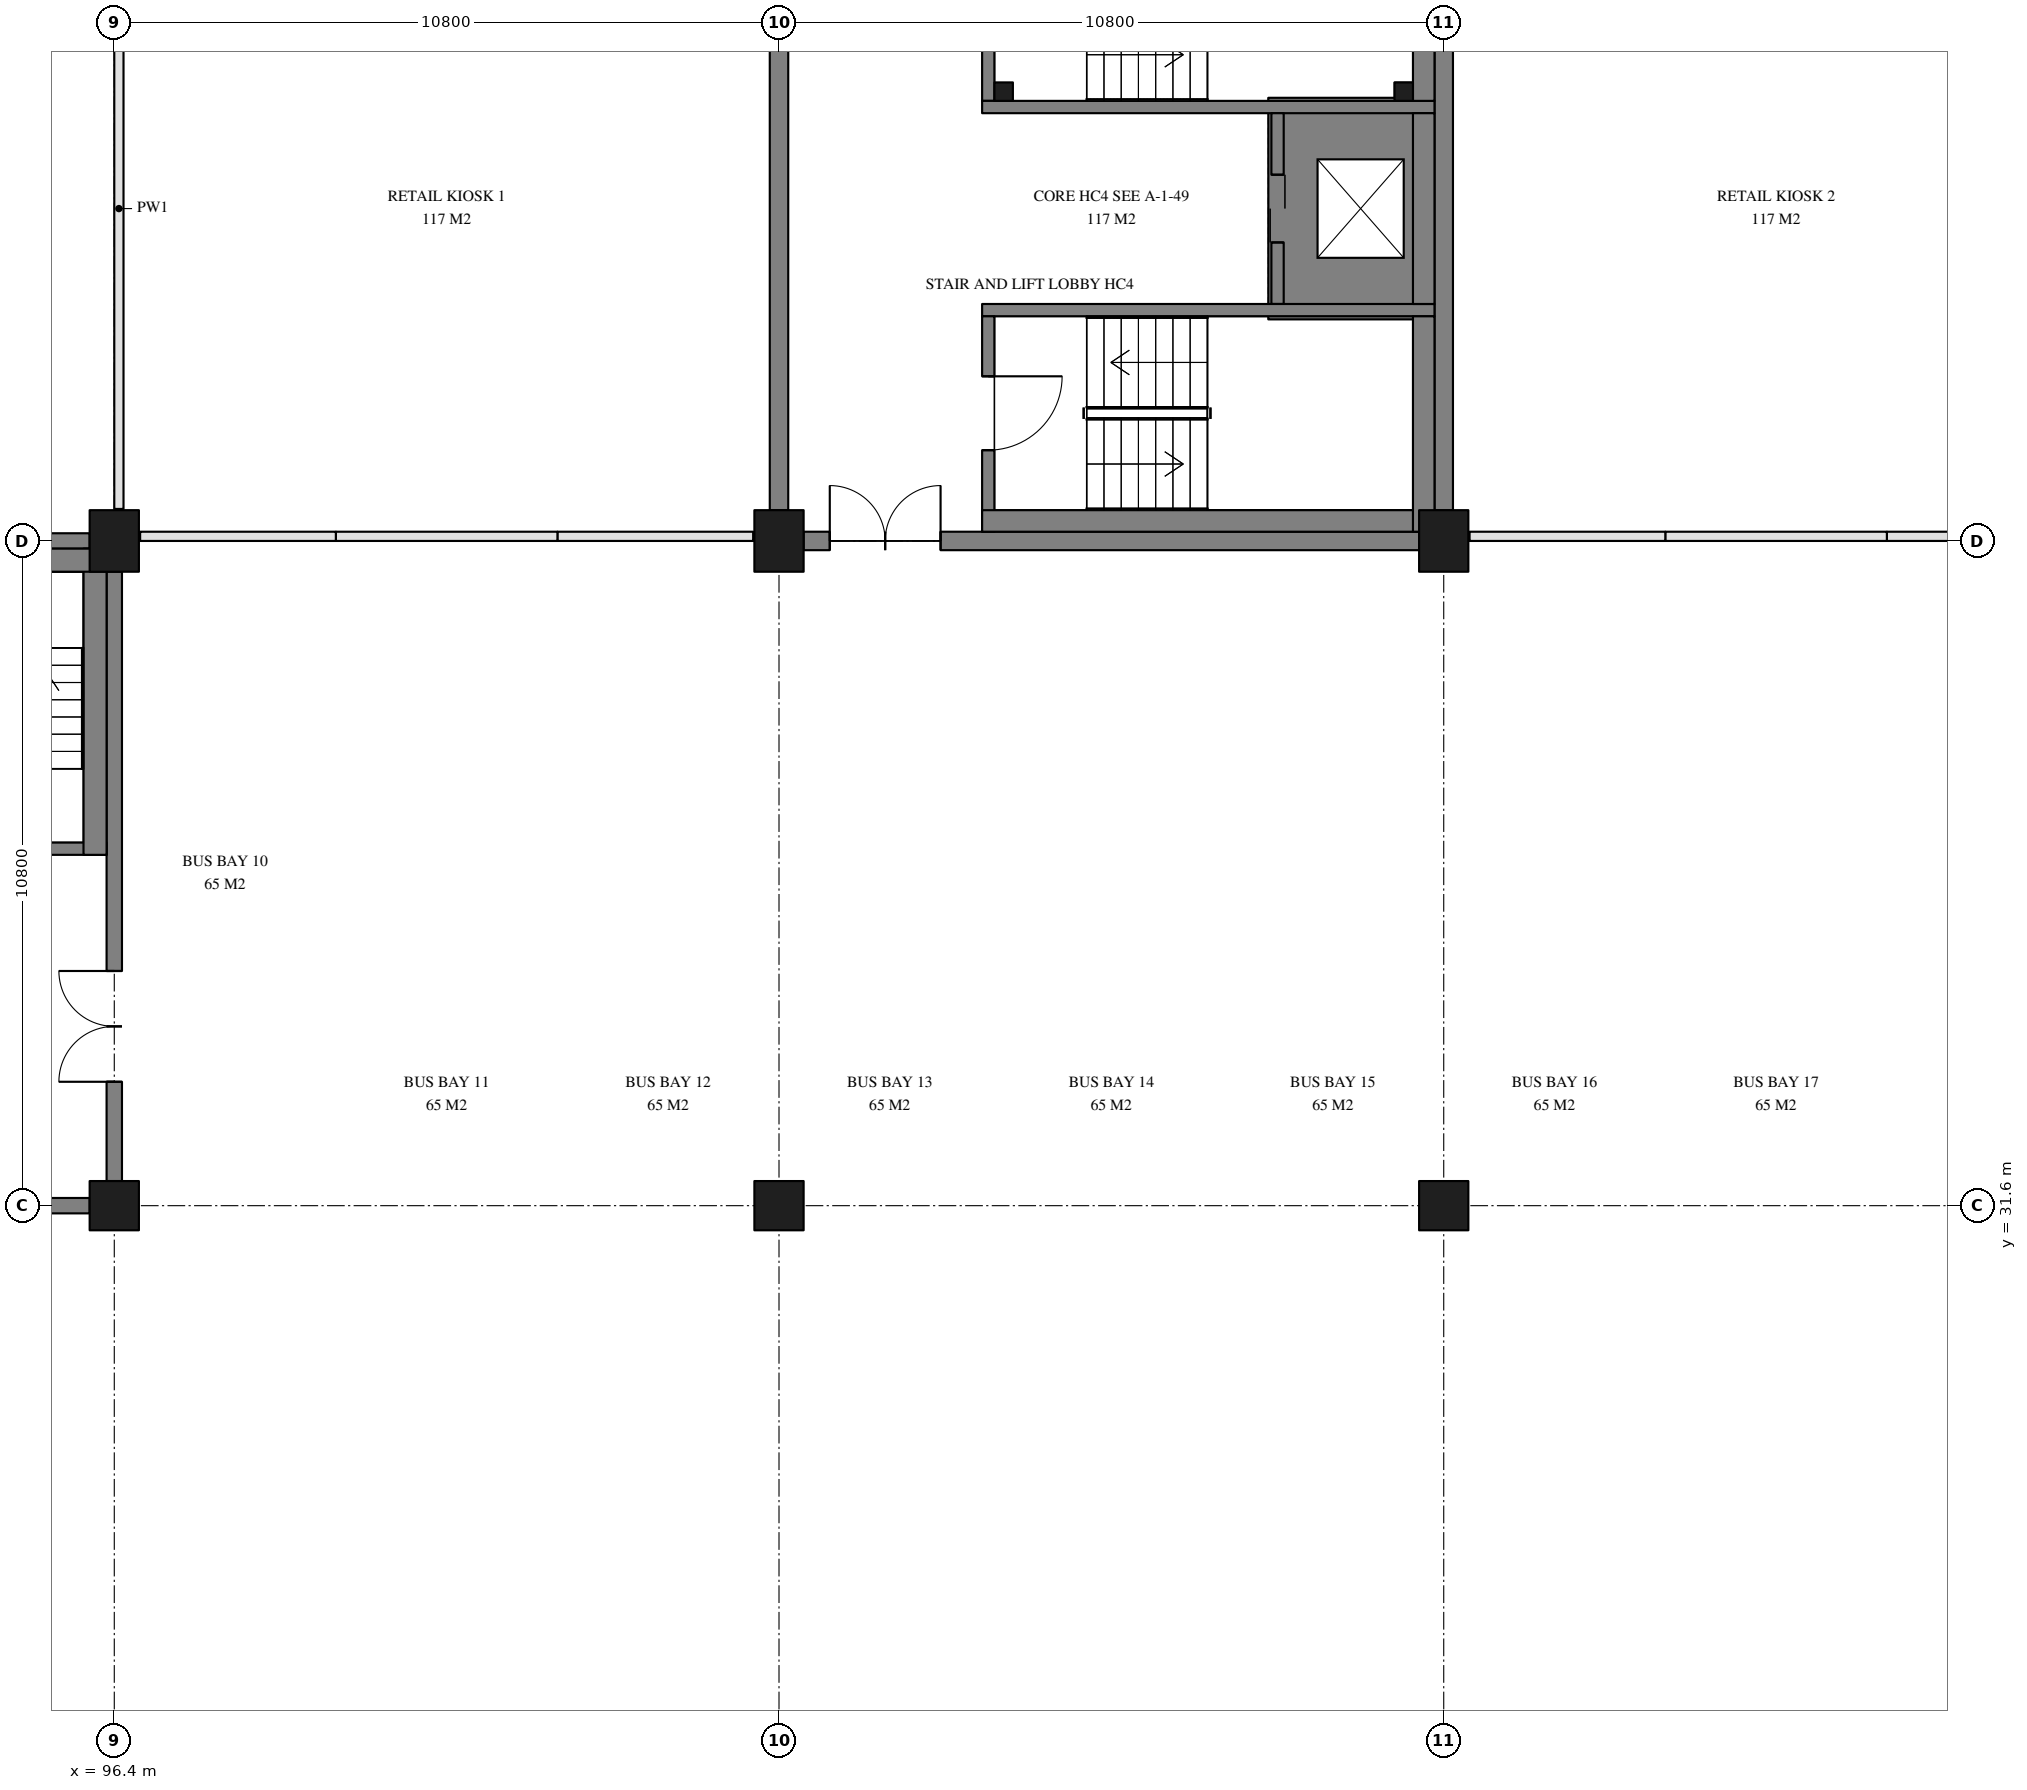
"""IFC4 building model, lengths in metres.
Left out: names, types, materials, properties, quantities, classifications, styles, units other than length and angle.
Written with IfcOpenShell. Run it as: python <this file> out.ifc"""

import sys

from ifc_helpers import new_model, si_unit, direction, frame, frame_2d, origin, origin_2d, place, context, subcontext, project, spatial, polyline, rectangle, outline, extrude, element, fill, save


model = new_model("IFC4")
c1 = context("Model", 3, precision=1e-05, world=origin(), true_north=direction((0.0, 1.0)))
c2 = subcontext(c1, "Body", "Model", "MODEL_VIEW")
j1 = project(units=[si_unit("LENGTHUNIT", "METRE"), si_unit("PLANEANGLEUNIT", "RADIAN")], contexts=[c1])
p1 = place(None, origin())
s1 = spatial("IfcSite", under=j1, at=p1, CompositionType="ELEMENT")
p2 = place(p1, origin())
s2 = spatial("IfcBuilding", under=s1, at=p2, CompositionType="ELEMENT")
p3 = place(p2, frame((0.0, 0.0, -5.4)))
s3 = spatial("IfcBuildingStorey", under=s2, at=p3, CompositionType="ELEMENT", Elevation=-5.4)
for number, where, z_axis, x_axis in (
    (1, (96.4, 42.4, -0.4), (0.0, 0.0, 1.0), (1.0, 0.0, 0.0)),
    (2, (107.2, 42.4, -0.4), (0.0, 0.0, 1.0), (1.0, 0.0, 0.0)),
    (3, (118.0, 42.4, -0.4), (0.0, 0.0, 1.0), (1.0, 0.0, 0.0)),
):
    element("IfcColumn", number, at=place(p3, frame(where, z_axis=z_axis, x_axis=x_axis)), inside=s3, PredefinedType="COLUMN", context=c2, shape_type="SweptSolid", body=[
        extrude(rectangle(XDim=0.8, YDim=1.0, at=origin_2d()), origin(), (0.0, 0.0, 1.0), 5.8),
    ])
for number, where, z_axis, x_axis in (
    (4, (96.4, 31.6, -0.4), (0.0, 0.0, 1.0), (1.0, 0.0, 0.0)),
    (5, (107.2, 31.6, -0.4), (0.0, 0.0, 1.0), (1.0, 0.0, 0.0)),
    (6, (118.0, 31.6, -0.4), (0.0, 0.0, 1.0), (1.0, 0.0, 0.0)),
):
    element("IfcColumn", number, at=place(p3, frame(where, z_axis=z_axis, x_axis=x_axis)), inside=s3, PredefinedType="COLUMN", context=c2, shape_type="SweptSolid", body=[
        extrude(rectangle(XDim=0.8, YDim=0.8, at=origin_2d()), origin(), (0.0, 0.0, 1.0), 5.8),
    ])
p4 = place(p3, frame((0.0, 0.0, -1.4)))
e7 = element("IfcWall", 7, at=p4, inside=s3, PredefinedType="SOLIDWALL", context=c2, shape_type="SweptSolid", body=[
    extrude(outline(polyline([(115.15, 49.6), (115.15, 46.0), (117.75, 46.0), (117.75, 49.6), (115.15, 49.6)]), holes=[polyline([(115.4, 46.25), (117.5, 46.25), (117.5, 49.35), (115.4, 49.35), (115.4, 46.25)])]), origin(), (0.0, 0.0, 1.0), 1.4),
])
p5 = place(p3, frame((107.6, 42.4, 0.0), z_axis=(0.0, 0.0, 1.0), x_axis=(1.0, 0.0, 0.0)))
e8 = element("IfcWall", 8, at=p5, inside=s3, PredefinedType="SOLIDWALL", context=c2, shape_type="SweptSolid", body=[
    extrude(rectangle(XDim=10.0, YDim=0.3, at=frame_2d((5.0, 0.0))), origin(), (0.0, 0.0, 1.0), 5.4),
])
p6 = place(p5, frame((0.425, 0.0, 0.0)))
e9 = element("IfcOpeningElement", 9, at=p6, cuts=e8, PredefinedType="OPENING", context=c2, shape_type="SweptSolid", body=[
    extrude(rectangle(XDim=1.8, YDim=2.1, at=frame_2d((0.9, 1.05))), frame((0.0, 0.16, 0.0), z_axis=(0.0, -1.0, 0.0), x_axis=(1.0, 0.0, 0.0)), (0.0, 0.0, 1.0), 0.32),
])
for number, where, z_axis, x_axis in (
    (10, (118.0, 42.9, 0.0), (0.0, 0.0, 1.0), (0.0, 1.0, 0.0)),
    (11, (107.2, 52.7, 0.0), (0.0, 0.0, 1.0), (0.0, -1.0, 0.0)),
):
    element("IfcWall", number, at=place(p3, frame(where, z_axis=z_axis, x_axis=x_axis)), inside=s3, PredefinedType="SOLIDWALL", context=c2, shape_type="SweptSolid", body=[
        extrude(rectangle(XDim=9.8, YDim=0.3, at=frame_2d((4.9, 0.0))), origin(), (0.0, 0.0, 1.0), 5.4),
    ])
p7 = place(p3, frame((86.0, 31.6, 0.0), z_axis=(0.0, 0.0, 1.0), x_axis=(1.0, 0.0, 0.0)))
e12 = element("IfcWall", 12, at=p7, inside=s3, PredefinedType="SOLIDWALL", context=c2, shape_type="SweptSolid", body=[
    extrude(rectangle(XDim=10.0, YDim=0.25, at=frame_2d((5.0, 0.0))), origin(), (0.0, 0.0, 1.0), 5.4),
])
p8 = place(p7, frame((4.1, 0.0, 0.0)))
e13 = element("IfcOpeningElement", 13, at=p8, cuts=e12, PredefinedType="OPENING", context=c2, shape_type="SweptSolid", body=[
    extrude(rectangle(XDim=1.8, YDim=2.1, at=frame_2d((0.9, 1.05))), frame((0.0, 0.135, 0.0), z_axis=(0.0, -1.0, 0.0), x_axis=(1.0, 0.0, 0.0)), (0.0, 0.0, 1.0), 0.27),
])
p9 = place(p3, frame((96.4, 32.0, 0.0), z_axis=(0.0, 0.0, 1.0), x_axis=(0.0, 1.0, 0.0)))
e14 = element("IfcWall", 14, at=p9, inside=s3, PredefinedType="SOLIDWALL", context=c2, shape_type="SweptSolid", body=[
    extrude(rectangle(XDim=9.9, YDim=0.25, at=frame_2d((4.95, 0.0))), origin(), (0.0, 0.0, 1.0), 5.4),
])
p10 = place(p9, frame((1.613, 0.0, 0.0)))
e15 = element("IfcOpeningElement", 15, at=p10, cuts=e14, PredefinedType="OPENING", context=c2, shape_type="SweptSolid", body=[
    extrude(rectangle(XDim=1.8, YDim=2.1, at=frame_2d((0.9, 1.05))), frame((0.0, 0.135, 0.0), z_axis=(0.0, -1.0, 0.0), x_axis=(1.0, 0.0, 0.0)), (0.0, 0.0, 1.0), 0.27),
])
p11 = place(p3, frame((96.0, 42.4, 0.0), z_axis=(0.0, 0.0, 1.0), x_axis=(-1.0, 0.0, 0.0)))
e16 = element("IfcWall", 16, at=p11, inside=s3, PredefinedType="SOLIDWALL", context=c2, shape_type="SweptSolid", body=[
    extrude(rectangle(XDim=10.0, YDim=0.25, at=frame_2d((5.0, 0.0))), origin(), (0.0, 0.0, 1.0), 5.4),
])
p12 = place(p3, frame((110.6, 53.05, 0.0), z_axis=(0.0, 0.0, 1.0), x_axis=(0.0, -1.0, 0.0)))
e17 = element("IfcWall", 17, at=p12, inside=s3, PredefinedType="SOLIDWALL", context=c2, shape_type="SweptSolid", body=[
    extrude(rectangle(XDim=3.5, YDim=0.2, at=frame_2d((1.75, 0.0))), origin(), (0.0, 0.0, 1.0), 4.8),
])
p13 = place(p12, frame((1.325, 0.0, 0.0)))
e18 = element("IfcOpeningElement", 18, at=p13, cuts=e17, PredefinedType="OPENING", context=c2, shape_type="SweptSolid", body=[
    extrude(rectangle(XDim=1.2, YDim=2.1, at=frame_2d((0.6, 1.05))), frame((0.0, 0.11, 0.0), z_axis=(0.0, -1.0, 0.0), x_axis=(1.0, 0.0, 0.0)), (0.0, 0.0, 1.0), 0.22),
])
p14 = place(p3, frame((110.5, 49.45, 0.0), z_axis=(0.0, 0.0, 1.0), x_axis=(1.0, 0.0, 0.0)))
e19 = element("IfcWall", 19, at=p14, inside=s3, PredefinedType="SOLIDWALL", context=c2, shape_type="SweptSolid", body=[
    extrude(rectangle(XDim=7.35, YDim=0.2, at=frame_2d((3.675, 0.0))), origin(), (0.0, 0.0, 1.0), 4.8),
])
p15 = place(p3, frame((115.3, 49.35, 0.0), z_axis=(0.0, 0.0, 1.0), x_axis=(0.0, -1.0, 0.0)))
e20 = element("IfcWall", 20, at=p15, inside=s3, PredefinedType="SOLIDWALL", context=c2, shape_type="SweptSolid", body=[
    extrude(rectangle(XDim=3.1, YDim=0.2, at=frame_2d((1.55, 0.0))), origin(), (0.0, 0.0, 1.0), 4.8),
])
p16 = place(p15, frame((1.0, 0.0, 0.0)))
e21 = element("IfcOpeningElement", 21, at=p16, cuts=e20, PredefinedType="OPENING", context=c2, shape_type="SweptSolid", body=[
    extrude(rectangle(XDim=1.1, YDim=2.1, at=frame_2d((0.55, 1.05))), frame((0.0, 0.11, 0.0), z_axis=(0.0, -1.0, 0.0), x_axis=(1.0, 0.0, 0.0)), (0.0, 0.0, 1.0), 0.22),
])
p17 = place(p3, frame((110.5, 46.15, 0.0), z_axis=(0.0, 0.0, 1.0), x_axis=(1.0, 0.0, 0.0)))
e22 = element("IfcWall", 22, at=p17, inside=s3, PredefinedType="SOLIDWALL", context=c2, shape_type="SweptSolid", body=[
    extrude(rectangle(XDim=7.35, YDim=0.2, at=frame_2d((3.675, 0.0))), origin(), (0.0, 0.0, 1.0), 4.8),
])
p18 = place(p3, frame((110.6, 46.05, 0.0), z_axis=(0.0, 0.0, 1.0), x_axis=(0.0, -1.0, 0.0)))
e23 = element("IfcWall", 23, at=p18, inside=s3, PredefinedType="SOLIDWALL", context=c2, shape_type="SweptSolid", body=[
    extrude(rectangle(XDim=3.5, YDim=0.2, at=frame_2d((1.75, 0.0))), origin(), (0.0, 0.0, 1.0), 4.8),
])
p19 = place(p18, frame((0.975, 0.0, 0.0)))
e24 = element("IfcOpeningElement", 24, at=p19, cuts=e23, PredefinedType="OPENING", context=c2, shape_type="SweptSolid", body=[
    extrude(rectangle(XDim=1.2, YDim=2.1, at=frame_2d((0.6, 1.05))), frame((0.0, 0.11, 0.0), z_axis=(0.0, -1.0, 0.0), x_axis=(1.0, 0.0, 0.0)), (0.0, 0.0, 1.0), 0.22),
])
p20 = place(p3, frame((117.675, 53.05, 0.0), z_axis=(0.0, 0.0, 1.0), x_axis=(0.0, -1.0, 0.0)))
e25 = element("IfcWall", 25, at=p20, inside=s3, PredefinedType="SOLIDWALL", context=c2, shape_type="SweptSolid", body=[
    extrude(rectangle(XDim=3.5, YDim=0.35, at=frame_2d((1.75, 0.0))), origin(), (0.0, 0.0, 1.0), 4.8),
])
p21 = place(p3, frame((110.5, 42.725, 0.0), z_axis=(0.0, 0.0, 1.0), x_axis=(1.0, 0.0, 0.0)))
e26 = element("IfcWall", 26, at=p21, inside=s3, PredefinedType="SOLIDWALL", context=c2, shape_type="SweptSolid", body=[
    extrude(rectangle(XDim=7.35, YDim=0.35, at=frame_2d((3.675, 0.0))), origin(), (0.0, 0.0, 1.0), 4.8),
])
p22 = place(p3, frame((117.675, 46.05, 0.0), z_axis=(0.0, 0.0, 1.0), x_axis=(0.0, -1.0, 0.0)))
e27 = element("IfcWall", 27, at=p22, inside=s3, PredefinedType="SOLIDWALL", context=c2, shape_type="SweptSolid", body=[
    extrude(rectangle(XDim=3.5, YDim=0.35, at=frame_2d((1.75, 0.0))), origin(), (0.0, 0.0, 1.0), 4.8),
])
p23 = place(p3, frame((117.675, 49.35, 0.0), z_axis=(0.0, 0.0, 1.0), x_axis=(0.0, -1.0, 0.0)))
e28 = element("IfcWall", 28, at=p23, inside=s3, PredefinedType="SOLIDWALL", context=c2, shape_type="SweptSolid", body=[
    extrude(rectangle(XDim=3.1, YDim=0.35, at=frame_2d((1.55, 0.0))), origin(), (0.0, 0.0, 1.0), 4.8),
])
p24 = place(p3, frame((117.35, 49.7, 0.0), z_axis=(0.0, 0.0, 1.0), x_axis=(1.0, 0.0, 0.0)))
e29 = element("IfcColumn", 29, at=p24, inside=s3, PredefinedType="COLUMN", context=c2, shape_type="SweptSolid", body=[
    extrude(rectangle(XDim=0.3, YDim=0.3, at=origin_2d()), origin(), (0.0, 0.0, 1.0), 3.85),
])
p25 = place(p3, frame((110.85, 49.7, 0.0), z_axis=(0.0, 0.0, 1.0), x_axis=(1.0, 0.0, 0.0)))
e30 = element("IfcColumn", 30, at=p25, inside=s3, PredefinedType="COLUMN", context=c2, shape_type="SweptSolid", body=[
    extrude(rectangle(XDim=0.3, YDim=0.3, at=origin_2d()), origin(), (0.0, 0.0, 1.0), 2.5),
])
p26 = place(p3, frame((93.35, 37.4, 0.0), z_axis=(0.0, 0.0, 1.0), x_axis=(1.0, 0.0, 0.0)))
e31 = element("IfcWall", 31, at=p26, inside=s3, PredefinedType="SOLIDWALL", context=c2, shape_type="SweptSolid", body=[
    extrude(rectangle(XDim=2.925, YDim=0.2, at=frame_2d((1.462, 0.0))), origin(), (0.0, 0.0, 1.0), 4.8),
])
p27 = place(p26, frame((0.675, 0.0, 0.0)))
e32 = element("IfcOpeningElement", 32, at=p27, cuts=e31, PredefinedType="OPENING", context=c2, shape_type="SweptSolid", body=[
    extrude(rectangle(XDim=1.2, YDim=2.1, at=frame_2d((0.6, 1.05))), frame((0.0, 0.11, 0.0), z_axis=(0.0, -1.0, 0.0), x_axis=(1.0, 0.0, 0.0)), (0.0, 0.0, 1.0), 0.22),
])
p28 = place(p3, frame((96.087, 37.3, 0.0), z_axis=(0.0, 0.0, 1.0), x_axis=(0.0, 1.0, 0.0)))
e33 = element("IfcWall", 33, at=p28, inside=s3, PredefinedType="SOLIDWALL", context=c2, shape_type="SweptSolid", body=[
    extrude(rectangle(XDim=4.975, YDim=0.375, at=frame_2d((2.487, 0.0))), origin(), (0.0, 0.0, 1.0), 4.8),
])
p29 = place(p3, frame((93.35, 42.087, 0.0), z_axis=(0.0, 0.0, 1.0), x_axis=(1.0, 0.0, 0.0)))
e34 = element("IfcWall", 34, at=p29, inside=s3, PredefinedType="SOLIDWALL", context=c2, shape_type="SweptSolid", body=[
    extrude(rectangle(XDim=2.925, YDim=0.375, at=frame_2d((1.462, 0.0))), origin(), (0.0, 0.0, 1.0), 4.8),
])
p30 = place(p3, frame((96.475, 42.92, 0.0), z_axis=(0.0, 0.0, 1.0), x_axis=(0.0, 1.0, 0.0)))
e35 = element("IfcWall", 35, at=p30, inside=s3, PredefinedType="PARTITIONING", context=c2, shape_type="SweptSolid", body=[
    extrude(rectangle(XDim=9.76, YDim=0.15, at=frame_2d((4.88, 0.0))), origin(), (0.0, 0.0, 1.0), 3.8),
])
p31 = place(p3, frame((103.6, 42.475, 0.0), z_axis=(0.0, 0.0, 1.0), x_axis=(1.0, 0.0, 0.0)))
e36 = element("IfcWall", 36, at=p31, inside=s3, PredefinedType="PARTITIONING", context=c2, shape_type="SweptSolid", body=[
    extrude(rectangle(XDim=3.18, YDim=0.15, at=frame_2d((1.59, 0.0))), origin(), (0.0, 0.0, 1.0), 3.8),
])
p32 = place(p3, frame((100.0, 42.475, 0.0), z_axis=(0.0, 0.0, 1.0), x_axis=(1.0, 0.0, 0.0)))
e37 = element("IfcWall", 37, at=p32, inside=s3, PredefinedType="PARTITIONING", context=c2, shape_type="SweptSolid", body=[
    extrude(rectangle(XDim=3.6, YDim=0.15, at=frame_2d((1.8, 0.0))), origin(), (0.0, 0.0, 1.0), 3.8),
])
for number, where, z_axis, x_axis in (
    (38, (96.82, 42.475, 0.0), (0.0, 0.0, 1.0), (1.0, 0.0, 0.0)),
    (39, (125.2, 42.475, 0.0), (0.0, 0.0, 1.0), (1.0, 0.0, 0.0)),
):
    element("IfcWall", number, at=place(p3, frame(where, z_axis=z_axis, x_axis=x_axis)), inside=s3, PredefinedType="PARTITIONING", context=c2, shape_type="SweptSolid", body=[
        extrude(rectangle(XDim=3.18, YDim=0.15, at=frame_2d((1.59, 0.0))), origin(), (0.0, 0.0, 1.0), 3.8),
    ])
p33 = place(p3, frame((121.6, 42.475, 0.0), z_axis=(0.0, 0.0, 1.0), x_axis=(1.0, 0.0, 0.0)))
e40 = element("IfcWall", 40, at=p33, inside=s3, PredefinedType="PARTITIONING", context=c2, shape_type="SweptSolid", body=[
    extrude(rectangle(XDim=3.6, YDim=0.15, at=frame_2d((1.8, 0.0))), origin(), (0.0, 0.0, 1.0), 3.8),
])
p34 = place(p3, frame((118.42, 42.475, 0.0), z_axis=(0.0, 0.0, 1.0), x_axis=(1.0, 0.0, 0.0)))
e41 = element("IfcWall", 41, at=p34, inside=s3, PredefinedType="PARTITIONING", context=c2, shape_type="SweptSolid", body=[
    extrude(rectangle(XDim=3.18, YDim=0.15, at=frame_2d((1.59, 0.0))), origin(), (0.0, 0.0, 1.0), 3.8),
])
p35 = place(p16, frame((1.1, 0.0, 0.0), z_axis=(0.0, 0.0, 1.0), x_axis=(-1.0, 0.0, 0.0)))
e42 = element("IfcDoor", 42, at=p35, inside=s3, OperationType="DOUBLE_DOOR_SLIDING", PredefinedType="DOOR", context=c2, shape_type="SweptSolid", body=[
    extrude(rectangle(XDim=1.1, YDim=2.1, at=frame_2d((0.55, 1.05))), frame((0.0, 0.025, 0.0), z_axis=(0.0, -1.0, 0.0), x_axis=(1.0, 0.0, 0.0)), (0.0, 0.0, 1.0), 0.05),
])
fill(e21, e42)
p36 = place(p19, frame((1.2, 0.0, 0.0), z_axis=(0.0, 0.0, 1.0), x_axis=(-1.0, 0.0, 0.0)))
e43 = element("IfcDoor", 43, at=p36, inside=s3, OperationType="SINGLE_SWING_RIGHT", PredefinedType="DOOR", context=c2, shape_type="SweptSolid", body=[
    extrude(rectangle(XDim=1.2, YDim=2.1, at=frame_2d((0.6, 1.05))), frame((0.0, 0.025, 0.0), z_axis=(0.0, -1.0, 0.0), x_axis=(1.0, 0.0, 0.0)), (0.0, 0.0, 1.0), 0.05),
])
fill(e24, e43)
p37 = place(p6, frame((1.8, 0.0, 0.0), z_axis=(0.0, 0.0, 1.0), x_axis=(-1.0, 0.0, 0.0)))
e44 = element("IfcDoor", 44, at=p37, inside=s3, OperationType="DOUBLE_DOOR_DOUBLE_SWING", PredefinedType="DOOR", context=c2, shape_type="SweptSolid", body=[
    extrude(rectangle(XDim=1.8, YDim=2.1, at=frame_2d((0.9, 1.05))), frame((0.0, 0.025, 0.0), z_axis=(0.0, -1.0, 0.0), x_axis=(1.0, 0.0, 0.0)), (0.0, 0.0, 1.0), 0.05),
])
fill(e9, e44)
p38 = place(p10, frame((1.8, 0.0, 0.0), z_axis=(0.0, 0.0, 1.0), x_axis=(-1.0, 0.0, 0.0)))
e45 = element("IfcDoor", 45, at=p38, inside=s3, OperationType="DOUBLE_DOOR_DOUBLE_SWING", PredefinedType="DOOR", context=c2, shape_type="SweptSolid", body=[
    extrude(rectangle(XDim=1.8, YDim=2.1, at=frame_2d((0.9, 1.05))), frame((0.0, 0.025, 0.0), z_axis=(0.0, -1.0, 0.0), x_axis=(1.0, 0.0, 0.0)), (0.0, 0.0, 1.0), 0.05),
])
fill(e15, e45)
save(model, sys.argv[1])
